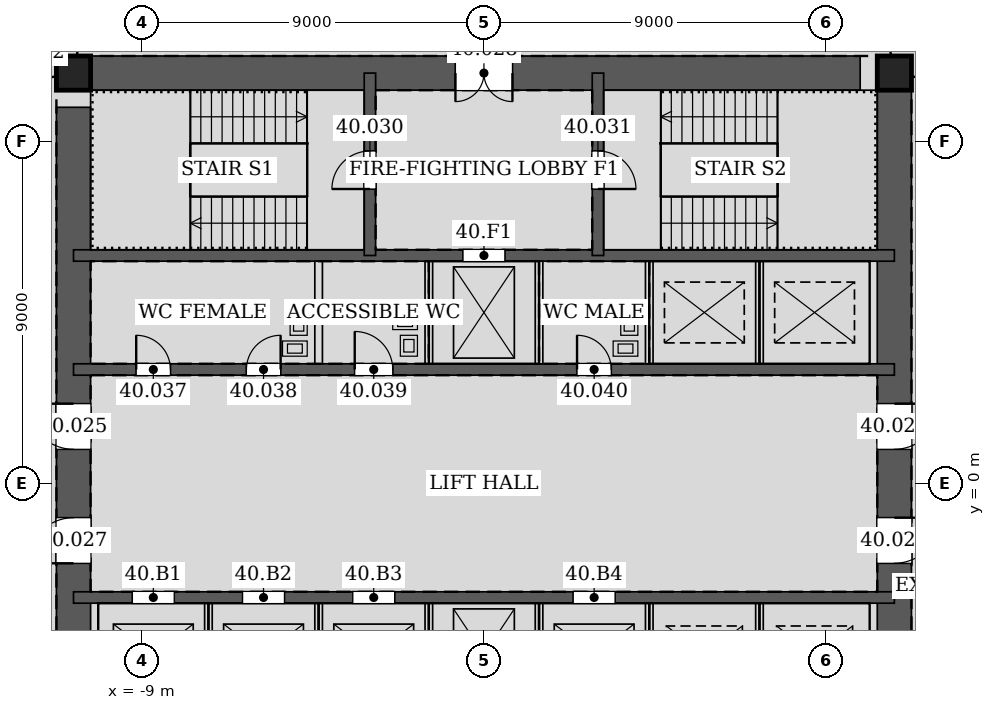
"""IFC4 building model, lengths in metres.
Left out: names, types, materials, properties, quantities, classifications, styles, units other than length and angle.
Written with IfcOpenShell. Run it as: python <this file> out.ifc"""

import sys

from ifc_helpers import new_model, si_unit, direction, frame, frame_2d, origin, origin_2d, place, context, subcontext, project, spatial, rectangle, hollow_rectangle, extrude, element, fill, save


model = new_model("IFC4")
c1 = context("Model", 3, precision=1e-05, world=origin(), true_north=direction((0.0, 1.0)))
c2 = subcontext(c1, "Body", "Model", "MODEL_VIEW")
j1 = project(units=[si_unit("LENGTHUNIT", "METRE"), si_unit("PLANEANGLEUNIT", "RADIAN")], contexts=[c1])
p1 = place(None, origin())
s1 = spatial("IfcSite", under=j1, at=p1, CompositionType="ELEMENT")
p2 = place(p1, origin())
s2 = spatial("IfcBuilding", under=s1, at=p2, CompositionType="ELEMENT")
p3 = place(p2, frame((0.0, 0.0, 176.4)))
s3 = spatial("IfcBuildingStorey", under=s2, at=p3, CompositionType="ELEMENT", Elevation=176.4)
for number, where, z_axis, x_axis in (
    (1, (10.8, 10.8, 0.0), (0.0, 0.0, 1.0), (1.0, 0.0, 0.0)),
    (2, (-10.8, 10.8, 0.0), (0.0, 0.0, 1.0), (1.0, 0.0, 0.0)),
):
    element("IfcColumn", number, at=place(p3, frame(where, z_axis=z_axis, x_axis=x_axis)), inside=s3, PredefinedType="COLUMN", context=c2, shape_type="SweptSolid", body=[
        extrude(hollow_rectangle(XDim=0.9, YDim=0.9, WallThickness=0.06, at=origin_2d()), origin(), (0.0, 0.0, 1.0), 4.2),
    ])
p4 = place(p3, frame((10.8, -10.8, 0.0), z_axis=(0.0, 0.0, 1.0), x_axis=(0.0, 1.0, 0.0)))
e3 = element("IfcWall", 3, at=p4, inside=s3, PredefinedType="SOLIDWALL", context=c2, shape_type="SweptSolid", body=[
    extrude(rectangle(XDim=21.6, YDim=0.9, at=frame_2d((10.8, 0.0))), origin(), (0.0, 0.0, 1.0), 4.2),
])
p5 = place(p4, frame((11.7, 0.0, 0.0)))
e4 = element("IfcOpeningElement", 4, at=p5, cuts=e3, PredefinedType="OPENING", context=c2, shape_type="SweptSolid", body=[
    extrude(rectangle(XDim=1.2, YDim=2.1, at=frame_2d((0.6, 1.05))), frame((0.0, 0.46, 0.0), z_axis=(0.0, -1.0, 0.0), x_axis=(1.0, 0.0, 0.0)), (0.0, 0.0, 1.0), 0.92),
])
p6 = place(p4, frame((8.7, 0.0, 0.0)))
e5 = element("IfcOpeningElement", 5, at=p6, cuts=e3, PredefinedType="OPENING", context=c2, shape_type="SweptSolid", body=[
    extrude(rectangle(XDim=1.2, YDim=2.1, at=frame_2d((0.6, 1.05))), frame((0.0, 0.46, 0.0), z_axis=(0.0, -1.0, 0.0), x_axis=(1.0, 0.0, 0.0)), (0.0, 0.0, 1.0), 0.92),
])
p7 = place(p3, frame((10.8, 10.8, 0.0), z_axis=(0.0, 0.0, 1.0), x_axis=(-1.0, 0.0, 0.0)))
e6 = element("IfcWall", 6, at=p7, inside=s3, PredefinedType="SOLIDWALL", context=c2, shape_type="SweptSolid", body=[
    extrude(rectangle(XDim=21.6, YDim=0.9, at=frame_2d((10.8, 0.0))), origin(), (0.0, 0.0, 1.0), 4.2),
])
p8 = place(p7, frame((10.05, 0.0, 0.0)))
e7 = element("IfcOpeningElement", 7, at=p8, cuts=e6, PredefinedType="OPENING", context=c2, shape_type="SweptSolid", body=[
    extrude(rectangle(XDim=1.5, YDim=2.1, at=frame_2d((0.75, 1.05))), frame((0.0, 0.46, 0.0), z_axis=(0.0, -1.0, 0.0), x_axis=(1.0, 0.0, 0.0)), (0.0, 0.0, 1.0), 0.92),
])
p9 = place(p3, frame((-10.8, 10.8, 0.0), z_axis=(0.0, 0.0, 1.0), x_axis=(0.0, -1.0, 0.0)))
e8 = element("IfcWall", 8, at=p9, inside=s3, PredefinedType="SOLIDWALL", context=c2, shape_type="SweptSolid", body=[
    extrude(rectangle(XDim=21.6, YDim=0.9, at=frame_2d((10.8, 0.0))), origin(), (0.0, 0.0, 1.0), 4.2),
])
p10 = place(p9, frame((8.7, 0.0, 0.0)))
e9 = element("IfcOpeningElement", 9, at=p10, cuts=e8, PredefinedType="OPENING", context=c2, shape_type="SweptSolid", body=[
    extrude(rectangle(XDim=1.2, YDim=2.1, at=frame_2d((0.6, 1.05))), frame((0.0, 0.46, 0.0), z_axis=(0.0, -1.0, 0.0), x_axis=(1.0, 0.0, 0.0)), (0.0, 0.0, 1.0), 0.92),
])
p11 = place(p9, frame((11.7, 0.0, 0.0)))
e10 = element("IfcOpeningElement", 10, at=p11, cuts=e8, PredefinedType="OPENING", context=c2, shape_type="SweptSolid", body=[
    extrude(rectangle(XDim=1.2, YDim=2.1, at=frame_2d((0.6, 1.05))), frame((0.0, 0.46, 0.0), z_axis=(0.0, -1.0, 0.0), x_axis=(1.0, 0.0, 0.0)), (0.0, 0.0, 1.0), 0.92),
])
p12 = place(p3, frame((-10.8, 3.0, 0.0), z_axis=(0.0, 0.0, 1.0), x_axis=(1.0, 0.0, 0.0)))
e11 = element("IfcWall", 11, at=p12, inside=s3, PredefinedType="SOLIDWALL", context=c2, shape_type="SweptSolid", body=[
    extrude(rectangle(XDim=21.6, YDim=0.3, at=frame_2d((10.8, 0.0))), origin(), (0.0, 0.0, 1.0), 4.2),
])
p13 = place(p12, frame((1.65, 0.0, 0.0)))
e12 = element("IfcOpeningElement", 12, at=p13, cuts=e11, PredefinedType="OPENING", context=c2, shape_type="SweptSolid", body=[
    extrude(rectangle(XDim=0.9, YDim=2.1, at=frame_2d((0.45, 1.05))), frame((0.0, 0.16, 0.0), z_axis=(0.0, -1.0, 0.0), x_axis=(1.0, 0.0, 0.0)), (0.0, 0.0, 1.0), 0.32),
])
p14 = place(p12, frame((4.55, 0.0, 0.0)))
e13 = element("IfcOpeningElement", 13, at=p14, cuts=e11, PredefinedType="OPENING", context=c2, shape_type="SweptSolid", body=[
    extrude(rectangle(XDim=0.9, YDim=2.1, at=frame_2d((0.45, 1.05))), frame((0.0, 0.16, 0.0), z_axis=(0.0, -1.0, 0.0), x_axis=(1.0, 0.0, 0.0)), (0.0, 0.0, 1.0), 0.32),
])
p15 = place(p12, frame((7.4, 0.0, 0.0)))
e14 = element("IfcOpeningElement", 14, at=p15, cuts=e11, PredefinedType="OPENING", context=c2, shape_type="SweptSolid", body=[
    extrude(rectangle(XDim=1.0, YDim=2.1, at=frame_2d((0.5, 1.05))), frame((0.0, 0.16, 0.0), z_axis=(0.0, -1.0, 0.0), x_axis=(1.0, 0.0, 0.0)), (0.0, 0.0, 1.0), 0.32),
])
p16 = place(p12, frame((13.25, 0.0, 0.0)))
e15 = element("IfcOpeningElement", 15, at=p16, cuts=e11, PredefinedType="OPENING", context=c2, shape_type="SweptSolid", body=[
    extrude(rectangle(XDim=0.9, YDim=2.1, at=frame_2d((0.45, 1.05))), frame((0.0, 0.16, 0.0), z_axis=(0.0, -1.0, 0.0), x_axis=(1.0, 0.0, 0.0)), (0.0, 0.0, 1.0), 0.32),
])
p17 = place(p3, frame((-10.8, 6.0, 0.0), z_axis=(0.0, 0.0, 1.0), x_axis=(1.0, 0.0, 0.0)))
e16 = element("IfcWall", 16, at=p17, inside=s3, PredefinedType="SOLIDWALL", context=c2, shape_type="SweptSolid", body=[
    extrude(rectangle(XDim=21.6, YDim=0.3, at=frame_2d((10.8, 0.0))), origin(), (0.0, 0.0, 1.0), 4.2),
])
p18 = place(p17, frame((10.25, 0.0, 0.0)))
e17 = element("IfcOpeningElement", 17, at=p18, cuts=e16, PredefinedType="OPENING", context=c2, shape_type="SweptSolid", body=[
    extrude(rectangle(XDim=1.1, YDim=2.1, at=frame_2d((0.55, 1.05))), frame((0.0, 0.16, 0.0), z_axis=(0.0, -1.0, 0.0), x_axis=(1.0, 0.0, 0.0)), (0.0, 0.0, 1.0), 0.32),
])
p19 = place(p3, frame((-3.0, 6.0, 0.0), z_axis=(0.0, 0.0, 1.0), x_axis=(0.0, 1.0, 0.0)))
e18 = element("IfcWall", 18, at=p19, inside=s3, PredefinedType="SOLIDWALL", context=c2, shape_type="SweptSolid", body=[
    extrude(rectangle(XDim=4.8, YDim=0.3, at=frame_2d((2.4, 0.0))), origin(), (0.0, 0.0, 1.0), 4.2),
])
p20 = place(p19, frame((1.75, 0.0, 0.0)))
e19 = element("IfcOpeningElement", 19, at=p20, cuts=e18, PredefinedType="OPENING", context=c2, shape_type="SweptSolid", body=[
    extrude(rectangle(XDim=1.0, YDim=2.1, at=frame_2d((0.5, 1.05))), frame((0.0, 0.16, 0.0), z_axis=(0.0, -1.0, 0.0), x_axis=(1.0, 0.0, 0.0)), (0.0, 0.0, 1.0), 0.32),
])
p21 = place(p3, frame((3.0, 6.0, 0.0), z_axis=(0.0, 0.0, 1.0), x_axis=(0.0, 1.0, 0.0)))
e20 = element("IfcWall", 20, at=p21, inside=s3, PredefinedType="SOLIDWALL", context=c2, shape_type="SweptSolid", body=[
    extrude(rectangle(XDim=4.8, YDim=0.3, at=frame_2d((2.4, 0.0))), origin(), (0.0, 0.0, 1.0), 4.2),
])
p22 = place(p21, frame((1.75, 0.0, 0.0)))
e21 = element("IfcOpeningElement", 21, at=p22, cuts=e20, PredefinedType="OPENING", context=c2, shape_type="SweptSolid", body=[
    extrude(rectangle(XDim=1.0, YDim=2.1, at=frame_2d((0.5, 1.05))), frame((0.0, 0.16, 0.0), z_axis=(0.0, -1.0, 0.0), x_axis=(1.0, 0.0, 0.0)), (0.0, 0.0, 1.0), 0.32),
])
p23 = place(p3, frame((-10.8, -3.0, 0.0), z_axis=(0.0, 0.0, 1.0), x_axis=(1.0, 0.0, 0.0)))
e22 = element("IfcWall", 22, at=p23, inside=s3, PredefinedType="SOLIDWALL", context=c2, shape_type="SweptSolid", body=[
    extrude(rectangle(XDim=21.6, YDim=0.3, at=frame_2d((10.8, 0.0))), origin(), (0.0, 0.0, 1.0), 4.2),
])
p24 = place(p23, frame((1.55, 0.0, 0.0)))
e23 = element("IfcOpeningElement", 23, at=p24, cuts=e22, PredefinedType="OPENING", context=c2, shape_type="SweptSolid", body=[
    extrude(rectangle(XDim=1.1, YDim=2.1, at=frame_2d((0.55, 1.05))), frame((0.0, 0.16, 0.0), z_axis=(0.0, -1.0, 0.0), x_axis=(1.0, 0.0, 0.0)), (0.0, 0.0, 1.0), 0.32),
])
p25 = place(p23, frame((4.45, 0.0, 0.0)))
e24 = element("IfcOpeningElement", 24, at=p25, cuts=e22, PredefinedType="OPENING", context=c2, shape_type="SweptSolid", body=[
    extrude(rectangle(XDim=1.1, YDim=2.1, at=frame_2d((0.55, 1.05))), frame((0.0, 0.16, 0.0), z_axis=(0.0, -1.0, 0.0), x_axis=(1.0, 0.0, 0.0)), (0.0, 0.0, 1.0), 0.32),
])
p26 = place(p23, frame((7.35, 0.0, 0.0)))
e25 = element("IfcOpeningElement", 25, at=p26, cuts=e22, PredefinedType="OPENING", context=c2, shape_type="SweptSolid", body=[
    extrude(rectangle(XDim=1.1, YDim=2.1, at=frame_2d((0.55, 1.05))), frame((0.0, 0.16, 0.0), z_axis=(0.0, -1.0, 0.0), x_axis=(1.0, 0.0, 0.0)), (0.0, 0.0, 1.0), 0.32),
])
p27 = place(p23, frame((13.15, 0.0, 0.0)))
e26 = element("IfcOpeningElement", 26, at=p27, cuts=e22, PredefinedType="OPENING", context=c2, shape_type="SweptSolid", body=[
    extrude(rectangle(XDim=1.1, YDim=2.1, at=frame_2d((0.55, 1.05))), frame((0.0, 0.16, 0.0), z_axis=(0.0, -1.0, 0.0), x_axis=(1.0, 0.0, 0.0)), (0.0, 0.0, 1.0), 0.32),
])
for number, where, z_axis, x_axis in (
    (27, (-4.35, 3.15, 0.0), (0.0, 0.0, 1.0), (0.0, 1.0, 0.0)),
    (28, (-1.45, 3.15, 0.0), (0.0, 0.0, 1.0), (0.0, 1.0, 0.0)),
    (29, (1.45, 3.15, 0.0), (0.0, 0.0, 1.0), (0.0, 1.0, 0.0)),
    (30, (4.35, 3.15, 0.0), (0.0, 0.0, 1.0), (0.0, 1.0, 0.0)),
):
    element("IfcWall", number, at=place(p3, frame(where, z_axis=z_axis, x_axis=x_axis)), inside=s3, PredefinedType="PARTITIONING", context=c2, shape_type="SweptSolid", body=[
        extrude(rectangle(XDim=2.7, YDim=0.2, at=frame_2d((1.35, 0.0))), origin(), (0.0, 0.0, 1.0), 4.035),
    ])
for number, where, z_axis, x_axis in (
    (31, (7.25, 3.15, 0.0), (0.0, 0.0, 1.0), (0.0, 1.0, 0.0)),
    (32, (-7.25, -5.85, 0.0), (0.0, 0.0, 1.0), (0.0, 1.0, 0.0)),
    (33, (-4.35, -5.85, 0.0), (0.0, 0.0, 1.0), (0.0, 1.0, 0.0)),
    (34, (-1.45, -5.85, 0.0), (0.0, 0.0, 1.0), (0.0, 1.0, 0.0)),
    (35, (1.45, -5.85, 0.0), (0.0, 0.0, 1.0), (0.0, 1.0, 0.0)),
    (36, (4.35, -5.85, 0.0), (0.0, 0.0, 1.0), (0.0, 1.0, 0.0)),
    (37, (7.25, -5.85, 0.0), (0.0, 0.0, 1.0), (0.0, 1.0, 0.0)),
):
    element("IfcWall", number, at=place(p3, frame(where, z_axis=z_axis, x_axis=x_axis)), inside=s3, PredefinedType="PARTITIONING", context=c2, shape_type="SweptSolid", body=[
        extrude(rectangle(XDim=2.7, YDim=0.2, at=frame_2d((1.35, 0.0))), origin(), (0.0, 0.0, 1.0), 4.2),
    ])
p28 = place(p5, frame((1.2, 0.0, 0.0), z_axis=(0.0, 0.0, 1.0), x_axis=(-1.0, 0.0, 0.0)))
e38 = element("IfcDoor", 38, at=p28, inside=s3, OperationType="SINGLE_SWING_LEFT", PredefinedType="DOOR", context=c2, shape_type="SweptSolid", body=[
    extrude(rectangle(XDim=1.2, YDim=2.1, at=frame_2d((0.6, 1.05))), frame((0.0, 0.025, 0.0), z_axis=(0.0, -1.0, 0.0), x_axis=(1.0, 0.0, 0.0)), (0.0, 0.0, 1.0), 0.05),
])
fill(e4, e38)
p29 = place(p10, frame((1.2, 0.0, 0.0), z_axis=(0.0, 0.0, 1.0), x_axis=(-1.0, 0.0, 0.0)))
e39 = element("IfcDoor", 39, at=p29, inside=s3, OperationType="SINGLE_SWING_RIGHT", PredefinedType="DOOR", context=c2, shape_type="SweptSolid", body=[
    extrude(rectangle(XDim=1.2, YDim=2.1, at=frame_2d((0.6, 1.05))), frame((0.0, 0.025, 0.0), z_axis=(0.0, -1.0, 0.0), x_axis=(1.0, 0.0, 0.0)), (0.0, 0.0, 1.0), 0.05),
])
fill(e9, e39)
p30 = place(p6, frame((1.2, 0.0, 0.0), z_axis=(0.0, 0.0, 1.0), x_axis=(-1.0, 0.0, 0.0)))
e40 = element("IfcDoor", 40, at=p30, inside=s3, OperationType="SINGLE_SWING_LEFT", PredefinedType="DOOR", context=c2, shape_type="SweptSolid", body=[
    extrude(rectangle(XDim=1.2, YDim=2.1, at=frame_2d((0.6, 1.05))), frame((0.0, 0.025, 0.0), z_axis=(0.0, -1.0, 0.0), x_axis=(1.0, 0.0, 0.0)), (0.0, 0.0, 1.0), 0.05),
])
fill(e5, e40)
p31 = place(p11, frame((1.2, 0.0, 0.0), z_axis=(0.0, 0.0, 1.0), x_axis=(-1.0, 0.0, 0.0)))
e41 = element("IfcDoor", 41, at=p31, inside=s3, OperationType="SINGLE_SWING_LEFT", PredefinedType="DOOR", context=c2, shape_type="SweptSolid", body=[
    extrude(rectangle(XDim=1.2, YDim=2.1, at=frame_2d((0.6, 1.05))), frame((0.0, 0.025, 0.0), z_axis=(0.0, -1.0, 0.0), x_axis=(1.0, 0.0, 0.0)), (0.0, 0.0, 1.0), 0.05),
])
fill(e10, e41)
p32 = place(p8, origin())
e42 = element("IfcDoor", 42, at=p32, inside=s3, OperationType="DOUBLE_DOOR_SINGLE_SWING", PredefinedType="DOOR", context=c2, shape_type="SweptSolid", body=[
    extrude(rectangle(XDim=1.5, YDim=2.1, at=frame_2d((0.75, 1.05))), frame((0.0, 0.025, 0.0), z_axis=(0.0, -1.0, 0.0), x_axis=(1.0, 0.0, 0.0)), (0.0, 0.0, 1.0), 0.05),
])
fill(e7, e42)
p33 = place(p20, origin())
e43 = element("IfcDoor", 43, at=p33, inside=s3, OperationType="SINGLE_SWING_LEFT", PredefinedType="DOOR", context=c2, shape_type="SweptSolid", body=[
    extrude(rectangle(XDim=1.0, YDim=2.1, at=frame_2d((0.5, 1.05))), frame((0.0, 0.025, 0.0), z_axis=(0.0, -1.0, 0.0), x_axis=(1.0, 0.0, 0.0)), (0.0, 0.0, 1.0), 0.05),
])
fill(e19, e43)
p34 = place(p22, frame((1.0, 0.0, 0.0), z_axis=(0.0, 0.0, 1.0), x_axis=(-1.0, 0.0, 0.0)))
e44 = element("IfcDoor", 44, at=p34, inside=s3, OperationType="SINGLE_SWING_RIGHT", PredefinedType="DOOR", context=c2, shape_type="SweptSolid", body=[
    extrude(rectangle(XDim=1.0, YDim=2.1, at=frame_2d((0.5, 1.05))), frame((0.0, 0.025, 0.0), z_axis=(0.0, -1.0, 0.0), x_axis=(1.0, 0.0, 0.0)), (0.0, 0.0, 1.0), 0.05),
])
fill(e21, e44)
p35 = place(p13, origin())
e45 = element("IfcDoor", 45, at=p35, inside=s3, OperationType="SINGLE_SWING_LEFT", PredefinedType="DOOR", context=c2, shape_type="SweptSolid", body=[
    extrude(rectangle(XDim=0.9, YDim=2.1, at=frame_2d((0.45, 1.05))), frame((0.0, 0.025, 0.0), z_axis=(0.0, -1.0, 0.0), x_axis=(1.0, 0.0, 0.0)), (0.0, 0.0, 1.0), 0.05),
])
fill(e12, e45)
p36 = place(p14, origin())
e46 = element("IfcDoor", 46, at=p36, inside=s3, OperationType="SINGLE_SWING_RIGHT", PredefinedType="DOOR", context=c2, shape_type="SweptSolid", body=[
    extrude(rectangle(XDim=0.9, YDim=2.1, at=frame_2d((0.45, 1.05))), frame((0.0, 0.025, 0.0), z_axis=(0.0, -1.0, 0.0), x_axis=(1.0, 0.0, 0.0)), (0.0, 0.0, 1.0), 0.05),
])
fill(e13, e46)
p37 = place(p15, origin())
e47 = element("IfcDoor", 47, at=p37, inside=s3, OperationType="SINGLE_SWING_LEFT", PredefinedType="DOOR", context=c2, shape_type="SweptSolid", body=[
    extrude(rectangle(XDim=1.0, YDim=2.1, at=frame_2d((0.5, 1.05))), frame((0.0, 0.025, 0.0), z_axis=(0.0, -1.0, 0.0), x_axis=(1.0, 0.0, 0.0)), (0.0, 0.0, 1.0), 0.05),
])
fill(e14, e47)
p38 = place(p16, origin())
e48 = element("IfcDoor", 48, at=p38, inside=s3, OperationType="SINGLE_SWING_LEFT", PredefinedType="DOOR", context=c2, shape_type="SweptSolid", body=[
    extrude(rectangle(XDim=0.9, YDim=2.1, at=frame_2d((0.45, 1.05))), frame((0.0, 0.025, 0.0), z_axis=(0.0, -1.0, 0.0), x_axis=(1.0, 0.0, 0.0)), (0.0, 0.0, 1.0), 0.05),
])
fill(e15, e48)
p39 = place(p18, origin())
e49 = element("IfcDoor", 49, at=p39, inside=s3, OperationType="DOUBLE_DOOR_SLIDING", PredefinedType="DOOR", context=c2, shape_type="SweptSolid", body=[
    extrude(rectangle(XDim=1.1, YDim=2.1, at=frame_2d((0.55, 1.05))), frame((0.0, 0.025, 0.0), z_axis=(0.0, -1.0, 0.0), x_axis=(1.0, 0.0, 0.0)), (0.0, 0.0, 1.0), 0.05),
])
fill(e17, e49)
p40 = place(p24, origin())
e50 = element("IfcDoor", 50, at=p40, inside=s3, OperationType="DOUBLE_DOOR_SLIDING", PredefinedType="DOOR", context=c2, shape_type="SweptSolid", body=[
    extrude(rectangle(XDim=1.1, YDim=2.1, at=frame_2d((0.55, 1.05))), frame((0.0, 0.025, 0.0), z_axis=(0.0, -1.0, 0.0), x_axis=(1.0, 0.0, 0.0)), (0.0, 0.0, 1.0), 0.05),
])
fill(e23, e50)
p41 = place(p25, origin())
e51 = element("IfcDoor", 51, at=p41, inside=s3, OperationType="DOUBLE_DOOR_SLIDING", PredefinedType="DOOR", context=c2, shape_type="SweptSolid", body=[
    extrude(rectangle(XDim=1.1, YDim=2.1, at=frame_2d((0.55, 1.05))), frame((0.0, 0.025, 0.0), z_axis=(0.0, -1.0, 0.0), x_axis=(1.0, 0.0, 0.0)), (0.0, 0.0, 1.0), 0.05),
])
fill(e24, e51)
p42 = place(p26, origin())
e52 = element("IfcDoor", 52, at=p42, inside=s3, OperationType="DOUBLE_DOOR_SLIDING", PredefinedType="DOOR", context=c2, shape_type="SweptSolid", body=[
    extrude(rectangle(XDim=1.1, YDim=2.1, at=frame_2d((0.55, 1.05))), frame((0.0, 0.025, 0.0), z_axis=(0.0, -1.0, 0.0), x_axis=(1.0, 0.0, 0.0)), (0.0, 0.0, 1.0), 0.05),
])
fill(e25, e52)
p43 = place(p27, origin())
e53 = element("IfcDoor", 53, at=p43, inside=s3, OperationType="DOUBLE_DOOR_SLIDING", PredefinedType="DOOR", context=c2, shape_type="SweptSolid", body=[
    extrude(rectangle(XDim=1.1, YDim=2.1, at=frame_2d((0.55, 1.05))), frame((0.0, 0.025, 0.0), z_axis=(0.0, -1.0, 0.0), x_axis=(1.0, 0.0, 0.0)), (0.0, 0.0, 1.0), 0.05),
])
fill(e26, e53)
save(model, sys.argv[1])
